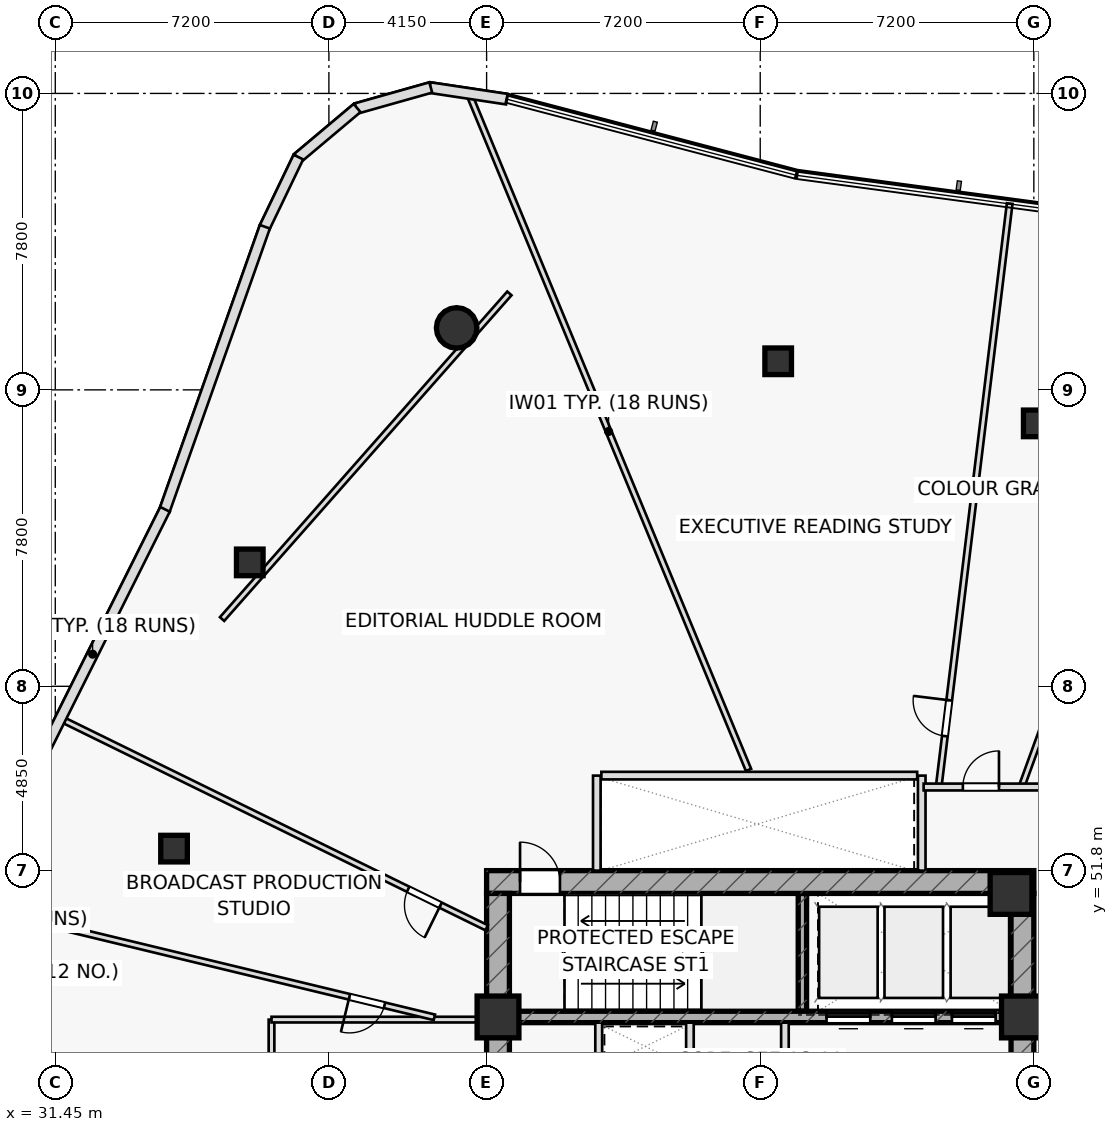
"""IFC4 building model, lengths in metres.
Left out: names, types, materials, properties, quantities, classifications, styles, units other than length and angle.
Written with IfcOpenShell. Run it as: python <this file> out.ifc"""

import sys

from ifc_helpers import new_model, si_unit, direction, frame, frame_2d, origin, origin_2d, place, context, subcontext, project, spatial, rectangle, hollow_rectangle, hollow_circle, extrude, element, fill, save


model = new_model("IFC4")
c1 = context("Model", 3, precision=1e-05, world=origin(), true_north=direction((0.0, 1.0)))
c2 = subcontext(c1, "Body", "Model", "MODEL_VIEW")
j1 = project(units=[si_unit("LENGTHUNIT", "METRE"), si_unit("PLANEANGLEUNIT", "RADIAN")], contexts=[c1])
p1 = place(None, origin())
s1 = spatial("IfcSite", under=j1, at=p1, CompositionType="ELEMENT")
p2 = place(p1, origin())
s2 = spatial("IfcBuilding", under=s1, at=p2, CompositionType="ELEMENT")
p3 = place(p2, frame((0.0, 0.0, 150.25)))
s3 = spatial("IfcBuildingStorey", under=s2, at=p3, CompositionType="ELEMENT", Elevation=150.25)
p4 = place(p3, frame((51.11, 48.1, 0.0), z_axis=(0.0, 0.0, 1.0), x_axis=(0.0, 1.0, 0.0)))
e1 = element("IfcWall", 1, at=p4, inside=s3, PredefinedType="SHEAR", context=c2, shape_type="SweptSolid", body=[
    extrude(rectangle(XDim=3.1, YDim=0.22, at=frame_2d((1.55, 0.0))), origin(), (0.0, 0.0, 1.0), 3.55),
])
p5 = place(p3, frame((42.8, 51.5, 0.0), z_axis=(0.0, 0.0, 1.0), x_axis=(1.0, 0.0, 0.0)))
e2 = element("IfcWall", 2, at=p5, inside=s3, PredefinedType="SHEAR", context=c2, shape_type="SweptSolid", body=[
    extrude(rectangle(XDim=14.4, YDim=0.6, at=frame_2d((7.2, 0.0))), origin(), (0.0, 0.0, 1.0), 3.55),
])
p6 = place(p5, frame((0.88, 0.0, 0.0)))
e3 = element("IfcOpeningElement", 3, at=p6, cuts=e2, PredefinedType="OPENING", context=c2, shape_type="SweptSolid", body=[
    extrude(rectangle(XDim=1.05, YDim=2.2, at=frame_2d((0.525, 1.1))), frame((0.0, 0.31, 0.0), z_axis=(0.0, -1.0, 0.0), x_axis=(1.0, 0.0, 0.0)), (0.0, 0.0, 1.0), 0.62),
])
p7 = place(p3, frame((43.1, 38.8, 0.0), z_axis=(0.0, 0.0, 1.0), x_axis=(0.0, 1.0, 0.0)))
e4 = element("IfcWall", 4, at=p7, inside=s3, PredefinedType="SHEAR", context=c2, shape_type="SweptSolid", body=[
    extrude(rectangle(XDim=12.4, YDim=0.6, at=frame_2d((6.2, 0.0))), origin(), (0.0, 0.0, 1.0), 3.55),
])
p8 = place(p3, frame((56.9, 38.8, 0.0), z_axis=(0.0, 0.0, 1.0), x_axis=(0.0, 1.0, 0.0)))
e5 = element("IfcWall", 5, at=p8, inside=s3, PredefinedType="SHEAR", context=c2, shape_type="SweptSolid", body=[
    extrude(rectangle(XDim=12.4, YDim=0.6, at=frame_2d((6.2, 0.0))), origin(), (0.0, 0.0, 1.0), 3.55),
])
p9 = place(p8, frame((3.85, 0.0, 0.0)))
e6 = element("IfcOpeningElement", 6, at=p9, cuts=e5, PredefinedType="OPENING", context=c2, shape_type="SweptSolid", body=[
    extrude(rectangle(XDim=1.5, YDim=2.2, at=frame_2d((0.75, 1.1))), frame((0.0, 0.31, 0.0), z_axis=(0.0, -1.0, 0.0), x_axis=(1.0, 0.0, 0.0)), (0.0, 0.0, 1.0), 0.62),
])
p10 = place(p3, frame((43.4, 47.95, 0.0), z_axis=(0.0, 0.0, 1.0), x_axis=(1.0, 0.0, 0.0)))
e7 = element("IfcWall", 7, at=p10, inside=s3, PredefinedType="SHEAR", context=c2, shape_type="SweptSolid", body=[
    extrude(rectangle(XDim=13.2, YDim=0.3, at=frame_2d((6.6, 0.0))), origin(), (0.0, 0.0, 1.0), 3.55),
])
p11 = place(p10, frame((8.345, 0.0, 0.0)))
e8 = element("IfcOpeningElement", 8, at=p11, cuts=e7, PredefinedType="OPENING", context=c2, shape_type="SweptSolid", body=[
    extrude(rectangle(XDim=1.15, YDim=2.2, at=frame_2d((0.575, 1.1))), frame((0.0, 0.16, 0.0), z_axis=(0.0, -1.0, 0.0), x_axis=(1.0, 0.0, 0.0)), (0.0, 0.0, 1.0), 0.32),
])
p12 = place(p10, frame((10.065, 0.0, 0.0)))
e9 = element("IfcOpeningElement", 9, at=p12, cuts=e7, PredefinedType="OPENING", context=c2, shape_type="SweptSolid", body=[
    extrude(rectangle(XDim=1.15, YDim=2.2, at=frame_2d((0.575, 1.1))), frame((0.0, 0.16, 0.0), z_axis=(0.0, -1.0, 0.0), x_axis=(1.0, 0.0, 0.0)), (0.0, 0.0, 1.0), 0.32),
])
p13 = place(p10, frame((11.645, 0.0, 0.0)))
e10 = element("IfcOpeningElement", 10, at=p13, cuts=e7, PredefinedType="OPENING", context=c2, shape_type="SweptSolid", body=[
    extrude(rectangle(XDim=1.15, YDim=2.2, at=frame_2d((0.575, 1.1))), frame((0.0, 0.16, 0.0), z_axis=(0.0, -1.0, 0.0), x_axis=(1.0, 0.0, 0.0)), (0.0, 0.0, 1.0), 0.32),
])
for number, where, z_axis, x_axis in (
    (11, (43.1, 47.95, 0.0), (0.0, 0.0, 1.0), (1.0, 0.0, 0.0)),
    (12, (56.9, 47.95, 0.0), (0.0, 0.0, 1.0), (1.0, 0.0, 0.0)),
    (13, (56.6, 51.2, 0.0), (0.0, 0.0, 1.0), (1.0, 0.0, 0.0)),
):
    element("IfcColumn", number, at=place(p3, frame(where, z_axis=z_axis, x_axis=x_axis)), inside=s3, PredefinedType="COLUMN", context=c2, shape_type="SweptSolid", body=[
        extrude(rectangle(XDim=1.1, YDim=1.1, at=origin_2d()), origin(), (0.0, 0.0, 1.0), 3.55),
    ])
p14 = place(p3, frame((42.011, 66.08, 0.0), z_axis=(0.0, 0.0, 1.0), x_axis=(1.0, 0.0, 0.0)))
e14 = element("IfcColumn", 14, at=p14, inside=s3, PredefinedType="COLUMN", context=c2, shape_type="SweptSolid", body=[
    extrude(hollow_circle(Radius=0.533, WallThickness=0.045, at=origin_2d()), origin(), (0.0, 0.0, 1.0), 3.55),
])
for number, where, z_axis, x_axis in (
    (15, (36.568, 59.911, 0.0), (0.0, 0.0, 1.0), (1.0, 0.0, 0.0)),
    (16, (34.575, 52.379, 0.0), (0.0, 0.0, 1.0), (1.0, 0.0, 0.0)),
    (17, (57.277, 63.568, 0.0), (0.0, 0.0, 1.0), (1.0, 0.0, 0.0)),
    (18, (50.472, 65.202, 0.0), (0.0, 0.0, 1.0), (1.0, 0.0, 0.0)),
):
    element("IfcColumn", number, at=place(p3, frame(where, z_axis=z_axis, x_axis=x_axis)), inside=s3, PredefinedType="COLUMN", context=c2, shape_type="SweptSolid", body=[
        extrude(hollow_rectangle(XDim=0.7, YDim=0.7, WallThickness=0.04, at=origin_2d()), origin(), (0.0, 0.0, 1.0), 3.55),
    ])
for number, where, z_axis, x_axis in (
    (19, (45.7, 51.8, 0.0), (0.0, 0.0, 1.0), (0.0, 1.0, 0.0)),
    (20, (54.25, 51.8, 0.0), (0.0, 0.0, 1.0), (0.0, 1.0, 0.0)),
):
    element("IfcWall", number, at=place(p3, frame(where, z_axis=z_axis, x_axis=x_axis)), inside=s3, PredefinedType="PARTITIONING", context=c2, shape_type="SweptSolid", body=[
        extrude(rectangle(XDim=2.5, YDim=0.2, at=frame_2d((1.25, 0.0))), origin(), (0.0, 0.0, 1.0), 3.55),
    ])
p15 = place(p3, frame((48.15, 46.55, 0.0), z_axis=(0.0, 0.0, 1.0), x_axis=(0.0, 1.0, 0.0)))
e21 = element("IfcWall", 21, at=p15, inside=s3, PredefinedType="PARTITIONING", context=c2, shape_type="SweptSolid", body=[
    extrude(rectangle(XDim=1.25, YDim=0.2, at=frame_2d((0.625, 0.0))), origin(), (0.0, 0.0, 1.0), 3.55),
])
p16 = place(p3, frame((50.65, 45.05, 0.0), z_axis=(0.0, 0.0, 1.0), x_axis=(0.0, 1.0, 0.0)))
e22 = element("IfcWall", 22, at=p16, inside=s3, PredefinedType="PARTITIONING", context=c2, shape_type="SweptSolid", body=[
    extrude(rectangle(XDim=2.75, YDim=0.2, at=frame_2d((1.375, 0.0))), origin(), (0.0, 0.0, 1.0), 3.55),
])
p17 = place(p3, frame((45.75, 42.2, 0.0), z_axis=(0.0, 0.0, 1.0), x_axis=(0.0, 1.0, 0.0)))
e23 = element("IfcWall", 23, at=p17, inside=s3, PredefinedType="PARTITIONING", context=c2, shape_type="SweptSolid", body=[
    extrude(rectangle(XDim=5.6, YDim=0.18, at=frame_2d((2.8, 0.0))), origin(), (0.0, 0.0, 1.0), 3.55),
])
p18 = place(p17, frame((0.42, 0.0, 0.0)))
e24 = element("IfcOpeningElement", 24, at=p18, cuts=e23, PredefinedType="OPENING", context=c2, shape_type="SweptSolid", body=[
    extrude(rectangle(XDim=0.85, YDim=2.05, at=frame_2d((0.425, 1.025))), frame((0.0, 0.1, 0.0), z_axis=(0.0, -1.0, 0.0), x_axis=(1.0, 0.0, 0.0)), (0.0, 0.0, 1.0), 0.2),
])
p19 = place(p17, frame((1.57, 0.0, 0.0)))
e25 = element("IfcOpeningElement", 25, at=p19, cuts=e23, PredefinedType="OPENING", context=c2, shape_type="SweptSolid", body=[
    extrude(rectangle(XDim=0.85, YDim=2.05, at=frame_2d((0.425, 1.025))), frame((0.0, 0.1, 0.0), z_axis=(0.0, -1.0, 0.0), x_axis=(1.0, 0.0, 0.0)), (0.0, 0.0, 1.0), 0.2),
])
p20 = place(p17, frame((2.8, 0.0, 0.0)))
e26 = element("IfcOpeningElement", 26, at=p20, cuts=e23, PredefinedType="OPENING", context=c2, shape_type="SweptSolid", body=[
    extrude(rectangle(XDim=0.9, YDim=2.05, at=frame_2d((0.45, 1.025))), frame((0.0, 0.1, 0.0), z_axis=(0.0, -1.0, 0.0), x_axis=(1.0, 0.0, 0.0)), (0.0, 0.0, 1.0), 0.2),
])
p21 = place(p3, frame((43.4, 66.989, 0.0), z_axis=(0.0, 0.0, 1.0), x_axis=(-0.661622343701, -0.749837231881, 0.0)))
e27 = element("IfcWall", 27, at=p21, inside=s3, PredefinedType="PARTITIONING", context=c2, shape_type="SweptSolid", body=[
    extrude(rectangle(XDim=11.427, YDim=0.15, at=frame_2d((5.714, 0.0))), origin(), (0.0, 0.0, 1.0), 2.835),
])
p22 = place(p3, frame((37.14, 40.3, 0.0), z_axis=(0.0, 0.0, 1.0), x_axis=(0.0, 1.0, 0.0)))
e28 = element("IfcWall", 28, at=p22, inside=s3, PredefinedType="PARTITIONING", context=c2, shape_type="SweptSolid", body=[
    extrude(rectangle(XDim=7.58, YDim=0.15, at=frame_2d((3.79, 0.0))), origin(), (0.0, 0.0, 1.0), 2.835),
])
p23 = place(p3, frame((37.14, 47.88, 0.0), z_axis=(0.0, 0.0, 1.0), x_axis=(1.0, 0.0, 0.0)))
e29 = element("IfcWall", 29, at=p23, inside=s3, PredefinedType="PARTITIONING", context=c2, shape_type="SweptSolid", body=[
    extrude(rectangle(XDim=5.66, YDim=0.15, at=frame_2d((2.83, 0.0))), origin(), (0.0, 0.0, 1.0), 2.835),
])
p24 = place(p3, frame((56.874, 54.0, 0.0), z_axis=(0.0, 0.0, 1.0), x_axis=(0.341852479972, 0.939753628318, 0.0)))
e30 = element("IfcWall", 30, at=p24, inside=s3, PredefinedType="PARTITIONING", context=c2, shape_type="SweptSolid", body=[
    extrude(rectangle(XDim=14.511, YDim=0.15, at=frame_2d((7.256, 0.0))), origin(), (0.0, 0.0, 1.0), 2.835),
])
p25 = place(p3, frame((54.696, 54.0, 0.0), z_axis=(0.0, 0.0, 1.0), x_axis=(0.12085747381, 0.99266987011, 0.0)))
e31 = element("IfcWall", 31, at=p25, inside=s3, PredefinedType="PARTITIONING", context=c2, shape_type="SweptSolid", body=[
    extrude(rectangle(XDim=15.466, YDim=0.15, at=frame_2d((7.733, 0.0))), origin(), (0.0, 0.0, 1.0), 2.835),
])
p26 = place(p25, frame((1.35, 0.0, 0.0)))
e32 = element("IfcOpeningElement", 32, at=p26, cuts=e31, PredefinedType="OPENING", context=c2, shape_type="SweptSolid", body=[
    extrude(rectangle(XDim=0.95, YDim=2.05, at=frame_2d((0.475, 1.025))), frame((0.0, 0.085, 0.0), z_axis=(0.0, -1.0, 0.0), x_axis=(1.0, 0.0, 0.0)), (0.0, 0.0, 1.0), 0.17),
])
p27 = place(p3, frame((49.692, 54.45, 0.0), z_axis=(0.0, 0.0, 1.0), x_axis=(-0.382144046981, 0.924102768829, 0.0)))
e33 = element("IfcWall", 33, at=p27, inside=s3, PredefinedType="PARTITIONING", context=c2, shape_type="SweptSolid", body=[
    extrude(rectangle(XDim=19.273, YDim=0.15, at=frame_2d((9.636, 0.0))), origin(), (0.0, 0.0, 1.0), 2.975),
])
p28 = place(p3, frame((42.8, 50.297, 0.0), z_axis=(0.0, 0.0, 1.0), x_axis=(-0.897818546691, 0.440365594951, 0.0)))
e34 = element("IfcWall", 34, at=p28, inside=s3, PredefinedType="PARTITIONING", context=c2, shape_type="SweptSolid", body=[
    extrude(rectangle(XDim=12.502, YDim=0.15, at=frame_2d((6.251, 0.0))), origin(), (0.0, 0.0, 1.0), 2.835),
])
p29 = place(p28, frame((1.35, 0.0, 0.0)))
e35 = element("IfcOpeningElement", 35, at=p29, cuts=e34, PredefinedType="OPENING", context=c2, shape_type="SweptSolid", body=[
    extrude(rectangle(XDim=0.95, YDim=2.05, at=frame_2d((0.475, 1.025))), frame((0.0, 0.085, 0.0), z_axis=(0.0, -1.0, 0.0), x_axis=(1.0, 0.0, 0.0)), (0.0, 0.0, 1.0), 0.17),
])
p30 = place(p3, frame((41.426, 47.94, 0.0), z_axis=(0.0, 0.0, 1.0), x_axis=(-0.972054043984, 0.234757184288, 0.0)))
e36 = element("IfcWall", 36, at=p30, inside=s3, PredefinedType="PARTITIONING", context=c2, shape_type="SweptSolid", body=[
    extrude(rectangle(XDim=11.525, YDim=0.15, at=frame_2d((5.762, 0.0))), origin(), (0.0, 0.0, 1.0), 2.835),
])
p31 = place(p30, frame((1.35, 0.0, 0.0)))
e37 = element("IfcOpeningElement", 37, at=p31, cuts=e36, PredefinedType="OPENING", context=c2, shape_type="SweptSolid", body=[
    extrude(rectangle(XDim=0.95, YDim=2.05, at=frame_2d((0.475, 1.025))), frame((0.0, 0.085, 0.0), z_axis=(0.0, -1.0, 0.0), x_axis=(1.0, 0.0, 0.0)), (0.0, 0.0, 1.0), 0.17),
])
p32 = place(p3, frame((54.3, 54.0, 0.0), z_axis=(0.0, 0.0, 1.0), x_axis=(1.0, 0.0, 0.0)))
e38 = element("IfcWall", 38, at=p32, inside=s3, PredefinedType="PARTITIONING", context=c2, shape_type="SweptSolid", body=[
    extrude(rectangle(XDim=5.15, YDim=0.18, at=frame_2d((2.575, 0.0))), origin(), (0.0, 0.0, 1.0), 2.835),
])
p33 = place(p32, frame((1.033, 0.0, 0.0)))
e39 = element("IfcOpeningElement", 39, at=p33, cuts=e38, PredefinedType="OPENING", context=c2, shape_type="SweptSolid", body=[
    extrude(rectangle(XDim=0.95, YDim=2.05, at=frame_2d((0.475, 1.025))), frame((0.0, 0.1, 0.0), z_axis=(0.0, -1.0, 0.0), x_axis=(1.0, 0.0, 0.0)), (0.0, 0.0, 1.0), 0.2),
])
p34 = place(p3, frame((43.332, 72.099, 0.0), z_axis=(0.0, 0.0, 1.0), x_axis=(-0.988890950593, 0.148642819654, 0.0)))
e40 = element("IfcWall", 40, at=p34, inside=s3, PredefinedType="STANDARD", context=c2, shape_type="SweptSolid", body=[
    extrude(rectangle(XDim=2.053, YDim=0.28, at=frame_2d((1.026, 0.0))), origin(), (0.0, 0.0, 1.0), 3.55),
])
p35 = place(p3, frame((41.331, 72.406, 0.0), z_axis=(0.0, 0.0, 1.0), x_axis=(-0.962479313421, -0.27135506488, 0.0)))
e41 = element("IfcWall", 41, at=p35, inside=s3, PredefinedType="STANDARD", context=c2, shape_type="SweptSolid", body=[
    extrude(rectangle(XDim=2.042, YDim=0.28, at=frame_2d((1.021, 0.0))), origin(), (0.0, 0.0, 1.0), 3.55),
])
p36 = place(p3, frame((39.392, 71.866, 0.0), z_axis=(0.0, 0.0, 1.0), x_axis=(-0.76546919467, -0.643472541769, 0.0)))
e42 = element("IfcWall", 42, at=p36, inside=s3, PredefinedType="STANDARD", context=c2, shape_type="SweptSolid", body=[
    extrude(rectangle(XDim=2.041, YDim=0.28, at=frame_2d((1.021, 0.0))), origin(), (0.0, 0.0, 1.0), 3.55),
])
p37 = place(p3, frame((37.847, 70.575, 0.0), z_axis=(0.0, 0.0, 1.0), x_axis=(-0.43286567125, -0.901458435344, 0.0)))
e43 = element("IfcWall", 43, at=p37, inside=s3, PredefinedType="STANDARD", context=c2, shape_type="SweptSolid", body=[
    extrude(rectangle(XDim=2.064, YDim=0.28, at=frame_2d((1.032, 0.0))), origin(), (0.0, 0.0, 1.0), 3.55),
])
p38 = place(p3, frame((36.965, 68.742, 0.0), z_axis=(0.0, 0.0, 1.0), x_axis=(-0.333429803675, -0.942774928613, 0.0)))
e44 = element("IfcWall", 44, at=p38, inside=s3, PredefinedType="STANDARD", context=c2, shape_type="SweptSolid", body=[
    extrude(rectangle(XDim=7.917, YDim=0.28, at=frame_2d((3.958, 0.0))), origin(), (0.0, 0.0, 1.0), 3.55),
])
p39 = place(p3, frame((34.337, 61.306, 0.0), z_axis=(0.0, 0.0, 1.0), x_axis=(-0.447041681191, -0.894513127505, 0.0)))
e45 = element("IfcWall", 45, at=p39, inside=s3, PredefinedType="STANDARD", context=c2, shape_type="SweptSolid", body=[
    extrude(rectangle(XDim=8.521, YDim=0.28, at=frame_2d((4.261, 0.0))), origin(), (0.0, 0.0, 1.0), 3.55),
])
p40 = place(p3, frame((45.82, 54.3, 0.0), z_axis=(0.0, 0.0, 1.0), x_axis=(1.0, 0.0, 0.0)))
e46 = element("IfcWall", 46, at=p40, inside=s3, PredefinedType="PARTITIONING", context=c2, shape_type="SweptSolid", body=[
    extrude(rectangle(XDim=8.31, YDim=0.2, at=frame_2d((4.155, 0.0))), origin(), (0.0, 0.0, 1.0), 3.55),
])
p41 = place(p6, origin())
e47 = element("IfcDoor", 47, at=p41, inside=s3, OperationType="SINGLE_SWING_LEFT", PredefinedType="DOOR", context=c2, shape_type="SweptSolid", body=[
    extrude(rectangle(XDim=1.05, YDim=2.2, at=frame_2d((0.525, 1.1))), frame((0.0, 0.025, 0.0), z_axis=(0.0, -1.0, 0.0), x_axis=(1.0, 0.0, 0.0)), (0.0, 0.0, 1.0), 0.05),
])
fill(e3, e47)
p42 = place(p26, origin())
e48 = element("IfcDoor", 48, at=p42, inside=s3, OperationType="SINGLE_SWING_RIGHT", PredefinedType="DOOR", context=c2, shape_type="SweptSolid", body=[
    extrude(rectangle(XDim=0.95, YDim=2.05, at=frame_2d((0.475, 1.025))), frame((0.0, 0.025, 0.0), z_axis=(0.0, -1.0, 0.0), x_axis=(1.0, 0.0, 0.0)), (0.0, 0.0, 1.0), 0.05),
])
fill(e32, e48)
p43 = place(p29, origin())
e49 = element("IfcDoor", 49, at=p43, inside=s3, OperationType="SINGLE_SWING_LEFT", PredefinedType="DOOR", context=c2, shape_type="SweptSolid", body=[
    extrude(rectangle(XDim=0.95, YDim=2.05, at=frame_2d((0.475, 1.025))), frame((0.0, 0.025, 0.0), z_axis=(0.0, -1.0, 0.0), x_axis=(1.0, 0.0, 0.0)), (0.0, 0.0, 1.0), 0.05),
])
fill(e35, e49)
p44 = place(p31, origin())
e50 = element("IfcDoor", 50, at=p44, inside=s3, OperationType="SINGLE_SWING_RIGHT", PredefinedType="DOOR", context=c2, shape_type="SweptSolid", body=[
    extrude(rectangle(XDim=0.95, YDim=2.05, at=frame_2d((0.475, 1.025))), frame((0.0, 0.025, 0.0), z_axis=(0.0, -1.0, 0.0), x_axis=(1.0, 0.0, 0.0)), (0.0, 0.0, 1.0), 0.05),
])
fill(e37, e50)
p45 = place(p33, origin())
e51 = element("IfcDoor", 51, at=p45, inside=s3, OperationType="SINGLE_SWING_RIGHT", PredefinedType="DOOR", context=c2, shape_type="SweptSolid", body=[
    extrude(rectangle(XDim=0.95, YDim=2.05, at=frame_2d((0.475, 1.025))), frame((0.0, 0.025, 0.0), z_axis=(0.0, -1.0, 0.0), x_axis=(1.0, 0.0, 0.0)), (0.0, 0.0, 1.0), 0.05),
])
fill(e39, e51)
p46 = place(p11, origin())
e52 = element("IfcDoor", 52, at=p46, inside=s3, OperationType="SLIDING_TO_LEFT", PredefinedType="DOOR", context=c2, shape_type="SweptSolid", body=[
    extrude(rectangle(XDim=1.15, YDim=2.2, at=frame_2d((0.575, 1.1))), frame((0.0, 0.025, 0.0), z_axis=(0.0, -1.0, 0.0), x_axis=(1.0, 0.0, 0.0)), (0.0, 0.0, 1.0), 0.05),
])
fill(e8, e52)
p47 = place(p12, origin())
e53 = element("IfcDoor", 53, at=p47, inside=s3, OperationType="SLIDING_TO_LEFT", PredefinedType="DOOR", context=c2, shape_type="SweptSolid", body=[
    extrude(rectangle(XDim=1.15, YDim=2.2, at=frame_2d((0.575, 1.1))), frame((0.0, 0.025, 0.0), z_axis=(0.0, -1.0, 0.0), x_axis=(1.0, 0.0, 0.0)), (0.0, 0.0, 1.0), 0.05),
])
fill(e9, e53)
p48 = place(p13, origin())
e54 = element("IfcDoor", 54, at=p48, inside=s3, OperationType="SLIDING_TO_LEFT", PredefinedType="DOOR", context=c2, shape_type="SweptSolid", body=[
    extrude(rectangle(XDim=1.15, YDim=2.2, at=frame_2d((0.575, 1.1))), frame((0.0, 0.025, 0.0), z_axis=(0.0, -1.0, 0.0), x_axis=(1.0, 0.0, 0.0)), (0.0, 0.0, 1.0), 0.05),
])
fill(e10, e54)
save(model, sys.argv[1])
